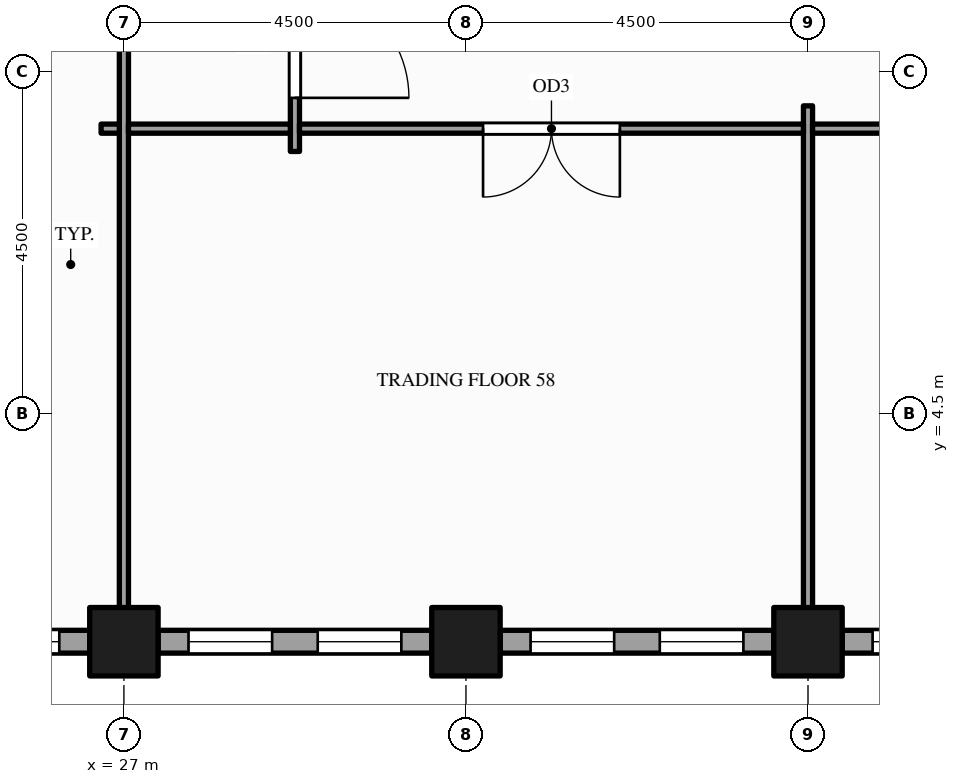
"""IFC4 building model, lengths in metres.
Left out: names, types, materials, properties, quantities, classifications, styles, units other than length and angle.
Written with IfcOpenShell. Run it as: python <this file> out.ifc"""

import sys

from ifc_helpers import new_model, si_unit, direction, frame, frame_2d, origin, origin_2d, place, context, subcontext, project, spatial, rectangle, hollow_rectangle, extrude, element, fill, save


model = new_model("IFC4")
c1 = context("Model", 3, precision=1e-05, world=origin(), true_north=direction((0.0, 1.0)))
c2 = subcontext(c1, "Body", "Model", "MODEL_VIEW")
j1 = project(units=[si_unit("LENGTHUNIT", "METRE"), si_unit("PLANEANGLEUNIT", "RADIAN")], contexts=[c1])
p1 = place(None, origin())
s1 = spatial("IfcSite", under=j1, at=p1, CompositionType="ELEMENT")
p2 = place(p1, origin())
s2 = spatial("IfcBuilding", under=s1, at=p2, CompositionType="ELEMENT")
p3 = place(p2, frame((0.0, 0.0, 171.0)))
s3 = spatial("IfcBuildingStorey", under=s2, at=p3, CompositionType="ELEMENT", Elevation=171.0)
for number, where, z_axis, x_axis in (
    (1, (27.0, 1.5, -0.15), (0.0, 0.0, 1.0), (1.0, 0.0, 0.0)),
    (2, (31.5, 1.5, -0.15), (0.0, 0.0, 1.0), (1.0, 0.0, 0.0)),
    (3, (36.0, 1.5, -0.15), (0.0, 0.0, 1.0), (1.0, 0.0, 0.0)),
):
    element("IfcColumn", number, at=place(p3, frame(where, z_axis=z_axis, x_axis=x_axis)), inside=s3, PredefinedType="COLUMN", context=c2, shape_type="SweptSolid", body=[
        extrude(hollow_rectangle(XDim=0.9, YDim=0.9, WallThickness=0.045, at=origin_2d()), origin(), (0.0, 0.0, 1.0), 4.0),
    ])
p4 = place(p3, frame((22.95, 1.5, 0.0), z_axis=(0.0, 0.0, 1.0), x_axis=(1.0, 0.0, 0.0)))
e4 = element("IfcWall", 4, at=p4, inside=s3, PredefinedType="STANDARD", context=c2, shape_type="SweptSolid", body=[
    extrude(rectangle(XDim=3.6, YDim=0.3, at=frame_2d((1.8, 0.0))), origin(), (0.0, 0.0, 1.0), 2.87),
])
p5 = place(p4, frame((0.4, 0.0, 0.9)))
e5 = element("IfcOpeningElement", 5, at=p5, cuts=e4, PredefinedType="OPENING", context=c2, shape_type="SweptSolid", body=[
    extrude(rectangle(XDim=1.1, YDim=1.75, at=frame_2d((0.55, 0.875))), frame((0.0, 0.16, 0.0), z_axis=(0.0, -1.0, 0.0), x_axis=(1.0, 0.0, 0.0)), (0.0, 0.0, 1.0), 0.32),
])
p6 = place(p4, frame((2.1, 0.0, 0.9)))
e6 = element("IfcOpeningElement", 6, at=p6, cuts=e4, PredefinedType="OPENING", context=c2, shape_type="SweptSolid", body=[
    extrude(rectangle(XDim=1.1, YDim=1.75, at=frame_2d((0.55, 0.875))), frame((0.0, 0.16, 0.0), z_axis=(0.0, -1.0, 0.0), x_axis=(1.0, 0.0, 0.0)), (0.0, 0.0, 1.0), 0.32),
])
p7 = place(p3, frame((27.45, 1.5, 0.0), z_axis=(0.0, 0.0, 1.0), x_axis=(1.0, 0.0, 0.0)))
e7 = element("IfcWall", 7, at=p7, inside=s3, PredefinedType="STANDARD", context=c2, shape_type="SweptSolid", body=[
    extrude(rectangle(XDim=3.6, YDim=0.3, at=frame_2d((1.8, 0.0))), origin(), (0.0, 0.0, 1.0), 2.87),
])
p8 = place(p7, frame((0.4, 0.0, 0.9)))
e8 = element("IfcOpeningElement", 8, at=p8, cuts=e7, PredefinedType="OPENING", context=c2, shape_type="SweptSolid", body=[
    extrude(rectangle(XDim=1.1, YDim=1.75, at=frame_2d((0.55, 0.875))), frame((0.0, 0.16, 0.0), z_axis=(0.0, -1.0, 0.0), x_axis=(1.0, 0.0, 0.0)), (0.0, 0.0, 1.0), 0.32),
])
p9 = place(p7, frame((2.1, 0.0, 0.9)))
e9 = element("IfcOpeningElement", 9, at=p9, cuts=e7, PredefinedType="OPENING", context=c2, shape_type="SweptSolid", body=[
    extrude(rectangle(XDim=1.1, YDim=1.75, at=frame_2d((0.55, 0.875))), frame((0.0, 0.16, 0.0), z_axis=(0.0, -1.0, 0.0), x_axis=(1.0, 0.0, 0.0)), (0.0, 0.0, 1.0), 0.32),
])
p10 = place(p3, frame((31.95, 1.5, 0.0), z_axis=(0.0, 0.0, 1.0), x_axis=(1.0, 0.0, 0.0)))
e10 = element("IfcWall", 10, at=p10, inside=s3, PredefinedType="STANDARD", context=c2, shape_type="SweptSolid", body=[
    extrude(rectangle(XDim=3.6, YDim=0.3, at=frame_2d((1.8, 0.0))), origin(), (0.0, 0.0, 1.0), 2.87),
])
p11 = place(p10, frame((0.4, 0.0, 0.9)))
e11 = element("IfcOpeningElement", 11, at=p11, cuts=e10, PredefinedType="OPENING", context=c2, shape_type="SweptSolid", body=[
    extrude(rectangle(XDim=1.1, YDim=1.75, at=frame_2d((0.55, 0.875))), frame((0.0, 0.16, 0.0), z_axis=(0.0, -1.0, 0.0), x_axis=(1.0, 0.0, 0.0)), (0.0, 0.0, 1.0), 0.32),
])
p12 = place(p10, frame((2.1, 0.0, 0.9)))
e12 = element("IfcOpeningElement", 12, at=p12, cuts=e10, PredefinedType="OPENING", context=c2, shape_type="SweptSolid", body=[
    extrude(rectangle(XDim=1.1, YDim=1.75, at=frame_2d((0.55, 0.875))), frame((0.0, 0.16, 0.0), z_axis=(0.0, -1.0, 0.0), x_axis=(1.0, 0.0, 0.0)), (0.0, 0.0, 1.0), 0.32),
])
p13 = place(p3, frame((36.45, 1.5, 0.0), z_axis=(0.0, 0.0, 1.0), x_axis=(1.0, 0.0, 0.0)))
e13 = element("IfcWall", 13, at=p13, inside=s3, PredefinedType="STANDARD", context=c2, shape_type="SweptSolid", body=[
    extrude(rectangle(XDim=3.6, YDim=0.3, at=frame_2d((1.8, 0.0))), origin(), (0.0, 0.0, 1.0), 2.87),
])
p14 = place(p13, frame((0.4, 0.0, 0.9)))
e14 = element("IfcOpeningElement", 14, at=p14, cuts=e13, PredefinedType="OPENING", context=c2, shape_type="SweptSolid", body=[
    extrude(rectangle(XDim=1.1, YDim=1.75, at=frame_2d((0.55, 0.875))), frame((0.0, 0.16, 0.0), z_axis=(0.0, -1.0, 0.0), x_axis=(1.0, 0.0, 0.0)), (0.0, 0.0, 1.0), 0.32),
])
p15 = place(p13, frame((2.1, 0.0, 0.9)))
e15 = element("IfcOpeningElement", 15, at=p15, cuts=e13, PredefinedType="OPENING", context=c2, shape_type="SweptSolid", body=[
    extrude(rectangle(XDim=1.1, YDim=1.75, at=frame_2d((0.55, 0.875))), frame((0.0, 0.16, 0.0), z_axis=(0.0, -1.0, 0.0), x_axis=(1.0, 0.0, 0.0)), (0.0, 0.0, 1.0), 0.32),
])
p16 = place(p3, frame((27.0, 1.65, 0.0), z_axis=(0.0, 0.0, 1.0), x_axis=(0.0, 1.0, 0.0)))
e16 = element("IfcWall", 16, at=p16, inside=s3, PredefinedType="PARTITIONING", context=c2, shape_type="SweptSolid", body=[
    extrude(rectangle(XDim=22.2, YDim=0.12, at=frame_2d((11.1, 0.0))), origin(), (0.0, 0.0, 1.0), 2.87),
])
p17 = place(p16, frame((9.975, 0.0, 0.0)))
e17 = element("IfcOpeningElement", 17, at=p17, cuts=e16, PredefinedType="OPENING", context=c2, shape_type="SweptSolid", body=[
    extrude(rectangle(XDim=1.5, YDim=2.1, at=frame_2d((0.75, 1.05))), frame((0.0, 0.07, 0.0), z_axis=(0.0, -1.0, 0.0), x_axis=(1.0, 0.0, 0.0)), (0.0, 0.0, 1.0), 0.14),
])
p18 = place(p16, frame((13.125, 0.0, 0.0)))
e18 = element("IfcOpeningElement", 18, at=p18, cuts=e16, PredefinedType="OPENING", context=c2, shape_type="SweptSolid", body=[
    extrude(rectangle(XDim=1.2, YDim=2.1, at=frame_2d((0.6, 1.05))), frame((0.0, 0.07, 0.0), z_axis=(0.0, -1.0, 0.0), x_axis=(1.0, 0.0, 0.0)), (0.0, 0.0, 1.0), 0.14),
])
p19 = place(p3, frame((29.25, 7.95, 0.0), z_axis=(0.0, 0.0, 1.0), x_axis=(0.0, 1.0, 0.0)))
e19 = element("IfcWall", 19, at=p19, inside=s3, PredefinedType="PARTITIONING", context=c2, shape_type="SweptSolid", body=[
    extrude(rectangle(XDim=9.6, YDim=0.12, at=frame_2d((4.8, 0.0))), origin(), (0.0, 0.0, 1.0), 2.87),
])
p20 = place(p19, frame((0.705, 0.0, 0.0)))
e20 = element("IfcOpeningElement", 20, at=p20, cuts=e19, PredefinedType="OPENING", context=c2, shape_type="SweptSolid", body=[
    extrude(rectangle(XDim=1.5, YDim=2.1, at=frame_2d((0.75, 1.05))), frame((0.0, 0.07, 0.0), z_axis=(0.0, -1.0, 0.0), x_axis=(1.0, 0.0, 0.0)), (0.0, 0.0, 1.0), 0.14),
])
p21 = place(p19, frame((7.395, 0.0, 0.0)))
e21 = element("IfcOpeningElement", 21, at=p21, cuts=e19, PredefinedType="OPENING", context=c2, shape_type="SweptSolid", body=[
    extrude(rectangle(XDim=1.5, YDim=2.1, at=frame_2d((0.75, 1.05))), frame((0.0, 0.07, 0.0), z_axis=(0.0, -1.0, 0.0), x_axis=(1.0, 0.0, 0.0)), (0.0, 0.0, 1.0), 0.14),
])
p22 = place(p3, frame((36.0, 1.65, 0.0), z_axis=(0.0, 0.0, 1.0), x_axis=(0.0, 1.0, 0.0)))
e22 = element("IfcWall", 22, at=p22, inside=s3, PredefinedType="PARTITIONING", context=c2, shape_type="SweptSolid", body=[
    extrude(rectangle(XDim=6.9, YDim=0.12, at=frame_2d((3.45, 0.0))), origin(), (0.0, 0.0, 1.0), 2.87),
])
p23 = place(p3, frame((26.7, 8.25, 0.0), z_axis=(0.0, 0.0, 1.0), x_axis=(1.0, 0.0, 0.0)))
e23 = element("IfcWall", 23, at=p23, inside=s3, PredefinedType="PARTITIONING", context=c2, shape_type="SweptSolid", body=[
    extrude(rectangle(XDim=0.24, YDim=0.12, at=frame_2d((0.12, 0.0))), origin(), (0.0, 0.0, 1.0), 2.87),
])
p24 = place(p3, frame((27.06, 8.25, 0.0), z_axis=(0.0, 0.0, 1.0), x_axis=(1.0, 0.0, 0.0)))
e24 = element("IfcWall", 24, at=p24, inside=s3, PredefinedType="PARTITIONING", context=c2, shape_type="SweptSolid", body=[
    extrude(rectangle(XDim=2.13, YDim=0.12, at=frame_2d((1.065, 0.0))), origin(), (0.0, 0.0, 1.0), 2.87),
])
p25 = place(p3, frame((29.31, 8.25, 0.0), z_axis=(0.0, 0.0, 1.0), x_axis=(1.0, 0.0, 0.0)))
e25 = element("IfcWall", 25, at=p25, inside=s3, PredefinedType="PARTITIONING", context=c2, shape_type="SweptSolid", body=[
    extrude(rectangle(XDim=6.63, YDim=0.12, at=frame_2d((3.315, 0.0))), origin(), (0.0, 0.0, 1.0), 2.87),
])
p26 = place(p25, frame((2.415, 0.0, 0.0)))
e26 = element("IfcOpeningElement", 26, at=p26, cuts=e25, PredefinedType="OPENING", context=c2, shape_type="SweptSolid", body=[
    extrude(rectangle(XDim=1.8, YDim=2.1, at=frame_2d((0.9, 1.05))), frame((0.0, 0.07, 0.0), z_axis=(0.0, -1.0, 0.0), x_axis=(1.0, 0.0, 0.0)), (0.0, 0.0, 1.0), 0.14),
])
p27 = place(p3, frame((36.06, 8.25, 0.0), z_axis=(0.0, 0.0, 1.0), x_axis=(1.0, 0.0, 0.0)))
e27 = element("IfcWall", 27, at=p27, inside=s3, PredefinedType="PARTITIONING", context=c2, shape_type="SweptSolid", body=[
    extrude(rectangle(XDim=4.38, YDim=0.12, at=frame_2d((2.19, 0.0))), origin(), (0.0, 0.0, 1.0), 2.87),
])
p28 = place(p27, frame((1.69, 0.0, 0.0)))
e28 = element("IfcOpeningElement", 28, at=p28, cuts=e27, PredefinedType="OPENING", context=c2, shape_type="SweptSolid", body=[
    extrude(rectangle(XDim=1.0, YDim=2.1, at=frame_2d((0.5, 1.05))), frame((0.0, 0.07, 0.0), z_axis=(0.0, -1.0, 0.0), x_axis=(1.0, 0.0, 0.0)), (0.0, 0.0, 1.0), 0.14),
])
p29 = place(p6, origin())
e29 = element("IfcWindow", 29, at=p29, inside=s3, PartitioningType="SINGLE_PANEL", PredefinedType="WINDOW", context=c2, shape_type="SweptSolid", body=[
    extrude(rectangle(XDim=1.1, YDim=1.75, at=frame_2d((0.55, 0.875))), frame((0.0, 0.03, 0.0), z_axis=(0.0, -1.0, 0.0), x_axis=(1.0, 0.0, 0.0)), (0.0, 0.0, 1.0), 0.06),
])
fill(e6, e29)
p30 = place(p8, origin())
e30 = element("IfcWindow", 30, at=p30, inside=s3, PartitioningType="SINGLE_PANEL", PredefinedType="WINDOW", context=c2, shape_type="SweptSolid", body=[
    extrude(rectangle(XDim=1.1, YDim=1.75, at=frame_2d((0.55, 0.875))), frame((0.0, 0.03, 0.0), z_axis=(0.0, -1.0, 0.0), x_axis=(1.0, 0.0, 0.0)), (0.0, 0.0, 1.0), 0.06),
])
fill(e8, e30)
p31 = place(p9, origin())
e31 = element("IfcWindow", 31, at=p31, inside=s3, PartitioningType="SINGLE_PANEL", PredefinedType="WINDOW", context=c2, shape_type="SweptSolid", body=[
    extrude(rectangle(XDim=1.1, YDim=1.75, at=frame_2d((0.55, 0.875))), frame((0.0, 0.03, 0.0), z_axis=(0.0, -1.0, 0.0), x_axis=(1.0, 0.0, 0.0)), (0.0, 0.0, 1.0), 0.06),
])
fill(e9, e31)
p32 = place(p11, origin())
e32 = element("IfcWindow", 32, at=p32, inside=s3, PartitioningType="SINGLE_PANEL", PredefinedType="WINDOW", context=c2, shape_type="SweptSolid", body=[
    extrude(rectangle(XDim=1.1, YDim=1.75, at=frame_2d((0.55, 0.875))), frame((0.0, 0.03, 0.0), z_axis=(0.0, -1.0, 0.0), x_axis=(1.0, 0.0, 0.0)), (0.0, 0.0, 1.0), 0.06),
])
fill(e11, e32)
p33 = place(p12, origin())
e33 = element("IfcWindow", 33, at=p33, inside=s3, PartitioningType="SINGLE_PANEL", PredefinedType="WINDOW", context=c2, shape_type="SweptSolid", body=[
    extrude(rectangle(XDim=1.1, YDim=1.75, at=frame_2d((0.55, 0.875))), frame((0.0, 0.03, 0.0), z_axis=(0.0, -1.0, 0.0), x_axis=(1.0, 0.0, 0.0)), (0.0, 0.0, 1.0), 0.06),
])
fill(e12, e33)
p34 = place(p14, origin())
e34 = element("IfcWindow", 34, at=p34, inside=s3, PartitioningType="SINGLE_PANEL", PredefinedType="WINDOW", context=c2, shape_type="SweptSolid", body=[
    extrude(rectangle(XDim=1.1, YDim=1.75, at=frame_2d((0.55, 0.875))), frame((0.0, 0.03, 0.0), z_axis=(0.0, -1.0, 0.0), x_axis=(1.0, 0.0, 0.0)), (0.0, 0.0, 1.0), 0.06),
])
fill(e14, e34)
p35 = place(p20, origin())
e35 = element("IfcDoor", 35, at=p35, inside=s3, OperationType="SINGLE_SWING_LEFT", PredefinedType="DOOR", context=c2, shape_type="SweptSolid", body=[
    extrude(rectangle(XDim=1.5, YDim=2.1, at=frame_2d((0.75, 1.05))), frame((0.0, 0.025, 0.0), z_axis=(0.0, -1.0, 0.0), x_axis=(1.0, 0.0, 0.0)), (0.0, 0.0, 1.0), 0.05),
])
fill(e20, e35)
p36 = place(p26, origin())
e36 = element("IfcDoor", 36, at=p36, inside=s3, OperationType="DOUBLE_DOOR_SINGLE_SWING", PredefinedType="DOOR", context=c2, shape_type="SweptSolid", body=[
    extrude(rectangle(XDim=1.8, YDim=2.1, at=frame_2d((0.9, 1.05))), frame((0.0, 0.025, 0.0), z_axis=(0.0, -1.0, 0.0), x_axis=(1.0, 0.0, 0.0)), (0.0, 0.0, 1.0), 0.05),
])
fill(e26, e36)
save(model, sys.argv[1])
